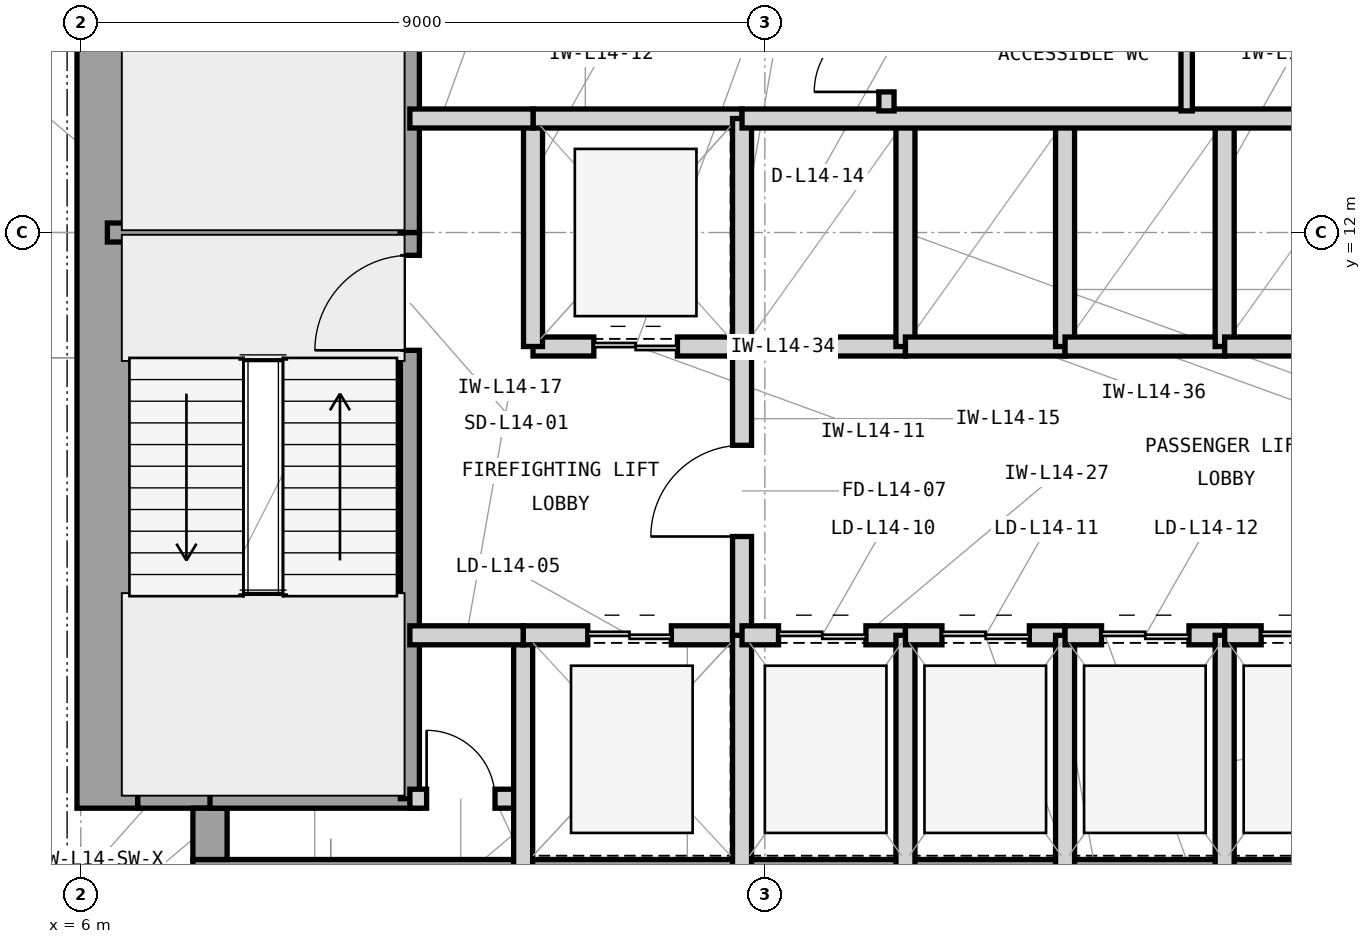
"""IFC4 building model, lengths in metres.
Left out: names, types, materials, properties, quantities, classifications, styles, units other than length and angle.
Written with IfcOpenShell. Run it as: python <this file> out.ifc"""

import sys

from ifc_helpers import new_model, si_unit, direction, frame, frame_2d, origin, place, context, subcontext, project, spatial, rectangle, extrude, element, fill, save


model = new_model("IFC4")
c1 = context("Model", 3, precision=1e-05, world=origin(), true_north=direction((0.0, 1.0)))
c2 = subcontext(c1, "Body", "Model", "MODEL_VIEW")
j1 = project(units=[si_unit("LENGTHUNIT", "METRE"), si_unit("PLANEANGLEUNIT", "RADIAN")], contexts=[c1])
p1 = place(None, origin())
s1 = spatial("IfcSite", under=j1, at=p1, CompositionType="ELEMENT")
p2 = place(p1, origin())
s2 = spatial("IfcBuilding", under=s1, at=p2, CompositionType="ELEMENT")
p3 = place(p2, frame((0.0, 0.0, 63.6)))
s3 = spatial("IfcBuildingStorey", under=s2, at=p3, CompositionType="ELEMENT", Elevation=63.6)
p4 = place(p3, frame((7.475, 3.35, 0.0), z_axis=(0.0, 0.0, 1.0), x_axis=(1.0, 0.0, 0.0)))
e1 = element("IfcWall", 1, at=p4, inside=s3, PredefinedType="SHEAR", context=c2, shape_type="SweptSolid", body=[
    extrude(rectangle(XDim=16.575, YDim=0.8, at=frame_2d((8.288, 0.0))), origin(), (0.0, 0.0, 1.0), 4.2),
])
p5 = place(p3, frame((6.35, 4.425, 0.0), z_axis=(0.0, 0.0, 1.0), x_axis=(0.0, 1.0, 0.0)))
e2 = element("IfcWall", 2, at=p5, inside=s3, PredefinedType="SHEAR", context=c2, shape_type="SweptSolid", body=[
    extrude(rectangle(XDim=15.15, YDim=0.8, at=frame_2d((7.575, 0.0))), origin(), (0.0, 0.0, 1.0), 4.2),
])
p6 = place(p3, frame((6.75, 4.65, 0.0), z_axis=(0.0, 0.0, 1.0), x_axis=(1.0, 0.0, 0.0)))
e3 = element("IfcWall", 3, at=p6, inside=s3, PredefinedType="SHEAR", context=c2, shape_type="SweptSolid", body=[
    extrude(rectangle(XDim=1.175, YDim=0.45, at=frame_2d((0.587, 0.0))), origin(), (0.0, 0.0, 1.0), 4.2),
])
p7 = place(p3, frame((7.7, 3.75, 0.0), z_axis=(0.0, 0.0, 1.0), x_axis=(0.0, 1.0, 0.0)))
e4 = element("IfcWall", 4, at=p7, inside=s3, PredefinedType="SHEAR", context=c2, shape_type="SweptSolid", body=[
    extrude(rectangle(XDim=0.675, YDim=0.45, at=frame_2d((0.337, 0.0))), origin(), (0.0, 0.0, 1.0), 4.2),
])
p8 = place(p3, frame((6.35, 12.0, 0.0), z_axis=(0.0, 0.0, 1.0), x_axis=(1.0, 0.0, 0.0)))
e5 = element("IfcWall", 5, at=p8, inside=s3, PredefinedType="SHEAR", context=c2, shape_type="SweptSolid", body=[
    extrude(rectangle(XDim=4.105, YDim=0.25, at=frame_2d((2.052, 0.0))), origin(), (0.0, 0.0, 1.0), 4.2),
])
p9 = place(p3, frame((7.7, 4.55, 0.0), z_axis=(0.0, 0.0, 1.0), x_axis=(1.0, 0.0, 0.0)))
e6 = element("IfcWall", 6, at=p9, inside=s3, PredefinedType="SHEAR", context=c2, shape_type="SweptSolid", body=[
    extrude(rectangle(XDim=2.755, YDim=0.25, at=frame_2d((1.377, 0.0))), origin(), (0.0, 0.0, 1.0), 4.2),
])
p10 = place(p3, frame((10.33, 4.55, 0.0), z_axis=(0.0, 0.0, 1.0), x_axis=(0.0, 1.0, 0.0)))
e7 = element("IfcWall", 7, at=p10, inside=s3, PredefinedType="SHEAR", context=c2, shape_type="SweptSolid", body=[
    extrude(rectangle(XDim=7.45, YDim=0.25, at=frame_2d((3.725, 0.0))), origin(), (0.0, 0.0, 1.0), 4.2),
])
p11 = place(p10, frame((5.9, 0.0, 0.0)))
e8 = element("IfcOpeningElement", 8, at=p11, cuts=e7, PredefinedType="OPENING", context=c2, shape_type="SweptSolid", body=[
    extrude(rectangle(XDim=1.25, YDim=2.2, at=frame_2d((0.625, 1.1))), frame((0.0, 0.135, 0.0), z_axis=(0.0, -1.0, 0.0), x_axis=(1.0, 0.0, 0.0)), (0.0, 0.0, 1.0), 0.27),
])
p12 = place(p3, frame((10.33, 12.0, 0.0), z_axis=(0.0, 0.0, 1.0), x_axis=(0.0, 1.0, 0.0)))
e9 = element("IfcWall", 9, at=p12, inside=s3, PredefinedType="SHEAR", context=c2, shape_type="SweptSolid", body=[
    extrude(rectangle(XDim=7.45, YDim=0.25, at=frame_2d((3.725, 0.0))), origin(), (0.0, 0.0, 1.0), 4.2),
])
p13 = place(p12, frame((5.85, 0.0, 0.0)))
e10 = element("IfcOpeningElement", 10, at=p13, cuts=e9, PredefinedType="OPENING", context=c2, shape_type="SweptSolid", body=[
    extrude(rectangle(XDim=1.25, YDim=2.2, at=frame_2d((0.625, 1.1))), frame((0.0, 0.135, 0.0), z_axis=(0.0, -1.0, 0.0), x_axis=(1.0, 0.0, 0.0)), (0.0, 0.0, 1.0), 0.27),
])
p14 = place(p3, frame((10.33, 4.55, 0.0), z_axis=(0.0, 0.0, 1.0), x_axis=(1.0, 0.0, 0.0)))
e11 = element("IfcWall", 11, at=p14, inside=s3, PredefinedType="PARTITIONING", context=c2, shape_type="SweptSolid", body=[
    extrude(rectangle(XDim=1.49, YDim=0.25, at=frame_2d((0.745, 0.0))), origin(), (0.0, 0.0, 1.0), 3.97),
])
p15 = place(p14, frame((0.22, 0.0, 0.0)))
e12 = element("IfcOpeningElement", 12, at=p15, cuts=e11, PredefinedType="OPENING", context=c2, shape_type="SweptSolid", body=[
    extrude(rectangle(XDim=0.9, YDim=2.1, at=frame_2d((0.45, 1.05))), frame((0.0, 0.135, 0.0), z_axis=(0.0, -1.0, 0.0), x_axis=(1.0, 0.0, 0.0)), (0.0, 0.0, 1.0), 0.27),
])
p16 = place(p3, frame((11.82, 3.35, 0.0), z_axis=(0.0, 0.0, 1.0), x_axis=(0.0, 1.0, 0.0)))
e13 = element("IfcWall", 13, at=p16, inside=s3, PredefinedType="PARTITIONING", context=c2, shape_type="SweptSolid", body=[
    extrude(rectangle(XDim=3.35, YDim=0.25, at=frame_2d((1.675, 0.0))), origin(), (0.0, 0.0, 1.0), 3.97),
])
p17 = place(p3, frame((11.82, 6.7, 0.0), z_axis=(0.0, 0.0, 1.0), x_axis=(1.0, 0.0, 0.0)))
e14 = element("IfcWall", 14, at=p17, inside=s3, PredefinedType="PARTITIONING", context=c2, shape_type="SweptSolid", body=[
    extrude(rectangle(XDim=2.88, YDim=0.25, at=frame_2d((1.44, 0.0))), origin(), (0.0, 0.0, 1.0), 3.426),
])
p18 = place(p17, frame((0.85, 0.0, 0.0)))
e15 = element("IfcOpeningElement", 15, at=p18, cuts=e14, PredefinedType="OPENING", context=c2, shape_type="SweptSolid", body=[
    extrude(rectangle(XDim=1.1, YDim=2.25, at=frame_2d((0.55, 1.125))), frame((0.0, 0.135, 0.0), z_axis=(0.0, -1.0, 0.0), x_axis=(1.0, 0.0, 0.0)), (0.0, 0.0, 1.0), 0.27),
])
p19 = place(p3, frame((14.7, 3.35, 0.0), z_axis=(0.0, 0.0, 1.0), x_axis=(0.0, 1.0, 0.0)))
e16 = element("IfcWall", 16, at=p19, inside=s3, PredefinedType="PARTITIONING", context=c2, shape_type="SweptSolid", body=[
    extrude(rectangle(XDim=3.35, YDim=0.25, at=frame_2d((1.675, 0.0))), origin(), (0.0, 0.0, 1.0), 3.97),
])
p20 = place(p3, frame((11.95, 10.5, 0.0), z_axis=(0.0, 0.0, 1.0), x_axis=(1.0, 0.0, 0.0)))
e17 = element("IfcWall", 17, at=p20, inside=s3, PredefinedType="PARTITIONING", context=c2, shape_type="SweptSolid", body=[
    extrude(rectangle(XDim=2.75, YDim=0.25, at=frame_2d((1.375, 0.0))), origin(), (0.0, 0.0, 1.0), 3.426),
])
p21 = place(p20, frame((0.8, 0.0, 0.0)))
e18 = element("IfcOpeningElement", 18, at=p21, cuts=e17, PredefinedType="OPENING", context=c2, shape_type="SweptSolid", body=[
    extrude(rectangle(XDim=1.1, YDim=2.25, at=frame_2d((0.55, 1.125))), frame((0.0, 0.135, 0.0), z_axis=(0.0, -1.0, 0.0), x_axis=(1.0, 0.0, 0.0)), (0.0, 0.0, 1.0), 0.27),
])
p22 = place(p3, frame((11.95, 10.5, 0.0), z_axis=(0.0, 0.0, 1.0), x_axis=(0.0, 1.0, 0.0)))
e19 = element("IfcWall", 19, at=p22, inside=s3, PredefinedType="PARTITIONING", context=c2, shape_type="SweptSolid", body=[
    extrude(rectangle(XDim=3.0, YDim=0.25, at=frame_2d((1.5, 0.0))), origin(), (0.0, 0.0, 1.0), 3.97),
])
p23 = place(p3, frame((11.95, 13.5, 0.0), z_axis=(0.0, 0.0, 1.0), x_axis=(1.0, 0.0, 0.0)))
e20 = element("IfcWall", 20, at=p23, inside=s3, PredefinedType="PARTITIONING", context=c2, shape_type="SweptSolid", body=[
    extrude(rectangle(XDim=2.75, YDim=0.25, at=frame_2d((1.375, 0.0))), origin(), (0.0, 0.0, 1.0), 3.426),
])
p24 = place(p3, frame((14.7, 10.5, 0.0), z_axis=(0.0, 0.0, 1.0), x_axis=(0.0, 1.0, 0.0)))
e21 = element("IfcWall", 21, at=p24, inside=s3, PredefinedType="PARTITIONING", context=c2, shape_type="SweptSolid", body=[
    extrude(rectangle(XDim=3.0, YDim=0.25, at=frame_2d((1.5, 0.0))), origin(), (0.0, 0.0, 1.0), 3.97),
])
p25 = place(p3, frame((14.7, 6.7, 0.0), z_axis=(0.0, 0.0, 1.0), x_axis=(0.0, 1.0, 0.0)))
e22 = element("IfcWall", 22, at=p25, inside=s3, PredefinedType="PARTITIONING", context=c2, shape_type="SweptSolid", body=[
    extrude(rectangle(XDim=3.8, YDim=0.25, at=frame_2d((1.9, 0.0))), origin(), (0.0, 0.0, 1.0), 3.97),
])
p26 = place(p25, frame((1.3, 0.0, 0.0)))
e23 = element("IfcOpeningElement", 23, at=p26, cuts=e22, PredefinedType="OPENING", context=c2, shape_type="SweptSolid", body=[
    extrude(rectangle(XDim=1.2, YDim=2.2, at=frame_2d((0.6, 1.1))), frame((0.0, 0.135, 0.0), z_axis=(0.0, -1.0, 0.0), x_axis=(1.0, 0.0, 0.0)), (0.0, 0.0, 1.0), 0.27),
])
p27 = place(p3, frame((10.33, 13.5, 0.0), z_axis=(0.0, 0.0, 1.0), x_axis=(1.0, 0.0, 0.0)))
e24 = element("IfcWall", 24, at=p27, inside=s3, PredefinedType="PARTITIONING", context=c2, shape_type="SweptSolid", body=[
    extrude(rectangle(XDim=1.62, YDim=0.25, at=frame_2d((0.81, 0.0))), origin(), (0.0, 0.0, 1.0), 3.426),
])
p28 = place(p3, frame((10.33, 6.7, 0.0), z_axis=(0.0, 0.0, 1.0), x_axis=(1.0, 0.0, 0.0)))
e25 = element("IfcWall", 25, at=p28, inside=s3, PredefinedType="PARTITIONING", context=c2, shape_type="SweptSolid", body=[
    extrude(rectangle(XDim=1.49, YDim=0.25, at=frame_2d((0.745, 0.0))), origin(), (0.0, 0.0, 1.0), 3.426),
])
p29 = place(p3, frame((14.7, 6.7, 0.0), z_axis=(0.0, 0.0, 1.0), x_axis=(1.0, 0.0, 0.0)))
e26 = element("IfcWall", 26, at=p29, inside=s3, PredefinedType="PARTITIONING", context=c2, shape_type="SweptSolid", body=[
    extrude(rectangle(XDim=2.15, YDim=0.25, at=frame_2d((1.075, 0.0))), origin(), (0.0, 0.0, 1.0), 3.426),
])
p30 = place(p29, frame((0.48, 0.0, 0.0)))
e27 = element("IfcOpeningElement", 27, at=p30, cuts=e26, PredefinedType="OPENING", context=c2, shape_type="SweptSolid", body=[
    extrude(rectangle(XDim=1.15, YDim=2.25, at=frame_2d((0.575, 1.125))), frame((0.0, 0.135, 0.0), z_axis=(0.0, -1.0, 0.0), x_axis=(1.0, 0.0, 0.0)), (0.0, 0.0, 1.0), 0.27),
])
p31 = place(p3, frame((16.85, 3.35, 0.0), z_axis=(0.0, 0.0, 1.0), x_axis=(0.0, 1.0, 0.0)))
e28 = element("IfcWall", 28, at=p31, inside=s3, PredefinedType="PARTITIONING", context=c2, shape_type="SweptSolid", body=[
    extrude(rectangle(XDim=3.35, YDim=0.25, at=frame_2d((1.675, 0.0))), origin(), (0.0, 0.0, 1.0), 3.97),
])
p32 = place(p3, frame((16.85, 6.7, 0.0), z_axis=(0.0, 0.0, 1.0), x_axis=(1.0, 0.0, 0.0)))
e29 = element("IfcWall", 29, at=p32, inside=s3, PredefinedType="PARTITIONING", context=c2, shape_type="SweptSolid", body=[
    extrude(rectangle(XDim=2.1, YDim=0.25, at=frame_2d((1.05, 0.0))), origin(), (0.0, 0.0, 1.0), 3.426),
])
p33 = place(p32, frame((0.48, 0.0, 0.0)))
e30 = element("IfcOpeningElement", 30, at=p33, cuts=e29, PredefinedType="OPENING", context=c2, shape_type="SweptSolid", body=[
    extrude(rectangle(XDim=1.15, YDim=2.25, at=frame_2d((0.575, 1.125))), frame((0.0, 0.135, 0.0), z_axis=(0.0, -1.0, 0.0), x_axis=(1.0, 0.0, 0.0)), (0.0, 0.0, 1.0), 0.27),
])
p34 = place(p3, frame((18.95, 3.35, 0.0), z_axis=(0.0, 0.0, 1.0), x_axis=(0.0, 1.0, 0.0)))
e31 = element("IfcWall", 31, at=p34, inside=s3, PredefinedType="PARTITIONING", context=c2, shape_type="SweptSolid", body=[
    extrude(rectangle(XDim=3.35, YDim=0.25, at=frame_2d((1.675, 0.0))), origin(), (0.0, 0.0, 1.0), 3.97),
])
p35 = place(p3, frame((18.95, 6.7, 0.0), z_axis=(0.0, 0.0, 1.0), x_axis=(1.0, 0.0, 0.0)))
e32 = element("IfcWall", 32, at=p35, inside=s3, PredefinedType="PARTITIONING", context=c2, shape_type="SweptSolid", body=[
    extrude(rectangle(XDim=2.1, YDim=0.25, at=frame_2d((1.05, 0.0))), origin(), (0.0, 0.0, 1.0), 3.426),
])
p36 = place(p35, frame((0.48, 0.0, 0.0)))
e33 = element("IfcOpeningElement", 33, at=p36, cuts=e32, PredefinedType="OPENING", context=c2, shape_type="SweptSolid", body=[
    extrude(rectangle(XDim=1.15, YDim=2.25, at=frame_2d((0.575, 1.125))), frame((0.0, 0.135, 0.0), z_axis=(0.0, -1.0, 0.0), x_axis=(1.0, 0.0, 0.0)), (0.0, 0.0, 1.0), 0.27),
])
p37 = place(p3, frame((21.05, 3.35, 0.0), z_axis=(0.0, 0.0, 1.0), x_axis=(0.0, 1.0, 0.0)))
e34 = element("IfcWall", 34, at=p37, inside=s3, PredefinedType="PARTITIONING", context=c2, shape_type="SweptSolid", body=[
    extrude(rectangle(XDim=3.35, YDim=0.25, at=frame_2d((1.675, 0.0))), origin(), (0.0, 0.0, 1.0), 3.97),
])
p38 = place(p3, frame((21.05, 6.7, 0.0), z_axis=(0.0, 0.0, 1.0), x_axis=(1.0, 0.0, 0.0)))
e35 = element("IfcWall", 35, at=p38, inside=s3, PredefinedType="PARTITIONING", context=c2, shape_type="SweptSolid", body=[
    extrude(rectangle(XDim=2.4, YDim=0.25, at=frame_2d((1.2, 0.0))), origin(), (0.0, 0.0, 1.0), 3.426),
])
p39 = place(p38, frame((0.48, 0.0, 0.0)))
e36 = element("IfcOpeningElement", 36, at=p39, cuts=e35, PredefinedType="OPENING", context=c2, shape_type="SweptSolid", body=[
    extrude(rectangle(XDim=1.15, YDim=2.25, at=frame_2d((0.575, 1.125))), frame((0.0, 0.135, 0.0), z_axis=(0.0, -1.0, 0.0), x_axis=(1.0, 0.0, 0.0)), (0.0, 0.0, 1.0), 0.27),
])
p40 = place(p3, frame((14.7, 10.5, 0.0), z_axis=(0.0, 0.0, 1.0), x_axis=(1.0, 0.0, 0.0)))
e37 = element("IfcWall", 37, at=p40, inside=s3, PredefinedType="PARTITIONING", context=c2, shape_type="SweptSolid", body=[
    extrude(rectangle(XDim=2.15, YDim=0.25, at=frame_2d((1.075, 0.0))), origin(), (0.0, 0.0, 1.0), 3.426),
])
p41 = place(p3, frame((16.85, 10.5, 0.0), z_axis=(0.0, 0.0, 1.0), x_axis=(0.0, 1.0, 0.0)))
e38 = element("IfcWall", 38, at=p41, inside=s3, PredefinedType="PARTITIONING", context=c2, shape_type="SweptSolid", body=[
    extrude(rectangle(XDim=3.0, YDim=0.25, at=frame_2d((1.5, 0.0))), origin(), (0.0, 0.0, 1.0), 3.97),
])
p42 = place(p3, frame((16.85, 10.5, 0.0), z_axis=(0.0, 0.0, 1.0), x_axis=(1.0, 0.0, 0.0)))
e39 = element("IfcWall", 39, at=p42, inside=s3, PredefinedType="PARTITIONING", context=c2, shape_type="SweptSolid", body=[
    extrude(rectangle(XDim=2.1, YDim=0.25, at=frame_2d((1.05, 0.0))), origin(), (0.0, 0.0, 1.0), 3.426),
])
p43 = place(p3, frame((18.95, 10.5, 0.0), z_axis=(0.0, 0.0, 1.0), x_axis=(0.0, 1.0, 0.0)))
e40 = element("IfcWall", 40, at=p43, inside=s3, PredefinedType="PARTITIONING", context=c2, shape_type="SweptSolid", body=[
    extrude(rectangle(XDim=3.0, YDim=0.25, at=frame_2d((1.5, 0.0))), origin(), (0.0, 0.0, 1.0), 3.97),
])
p44 = place(p3, frame((18.95, 10.5, 0.0), z_axis=(0.0, 0.0, 1.0), x_axis=(1.0, 0.0, 0.0)))
e41 = element("IfcWall", 41, at=p44, inside=s3, PredefinedType="PARTITIONING", context=c2, shape_type="SweptSolid", body=[
    extrude(rectangle(XDim=2.1, YDim=0.25, at=frame_2d((1.05, 0.0))), origin(), (0.0, 0.0, 1.0), 3.426),
])
p45 = place(p3, frame((21.05, 10.5, 0.0), z_axis=(0.0, 0.0, 1.0), x_axis=(0.0, 1.0, 0.0)))
e42 = element("IfcWall", 42, at=p45, inside=s3, PredefinedType="PARTITIONING", context=c2, shape_type="SweptSolid", body=[
    extrude(rectangle(XDim=3.0, YDim=0.25, at=frame_2d((1.5, 0.0))), origin(), (0.0, 0.0, 1.0), 3.97),
])
p46 = place(p3, frame((21.05, 10.5, 0.0), z_axis=(0.0, 0.0, 1.0), x_axis=(1.0, 0.0, 0.0)))
e43 = element("IfcWall", 43, at=p46, inside=s3, PredefinedType="PARTITIONING", context=c2, shape_type="SweptSolid", body=[
    extrude(rectangle(XDim=2.4, YDim=0.25, at=frame_2d((1.2, 0.0))), origin(), (0.0, 0.0, 1.0), 3.426),
])
p47 = place(p3, frame((14.7, 13.5, 0.0), z_axis=(0.0, 0.0, 1.0), x_axis=(1.0, 0.0, 0.0)))
e44 = element("IfcWall", 44, at=p47, inside=s3, PredefinedType="PARTITIONING", context=c2, shape_type="SweptSolid", body=[
    extrude(rectangle(XDim=8.95, YDim=0.25, at=frame_2d((4.475, 0.0))), origin(), (0.0, 0.0, 1.0), 3.426),
])
p48 = place(p3, frame((16.6, 13.6, 0.0), z_axis=(0.0, 0.0, 1.0), x_axis=(0.0, 1.0, 0.0)))
e45 = element("IfcWall", 45, at=p48, inside=s3, PredefinedType="PARTITIONING", context=c2, shape_type="SweptSolid", body=[
    extrude(rectangle(XDim=3.0, YDim=0.2, at=frame_2d((1.5, 0.0))), origin(), (0.0, 0.0, 1.0), 3.97),
])
p49 = place(p48, frame((0.25, 0.0, 0.0)))
e46 = element("IfcOpeningElement", 46, at=p49, cuts=e45, PredefinedType="OPENING", context=c2, shape_type="SweptSolid", body=[
    extrude(rectangle(XDim=0.95, YDim=2.1, at=frame_2d((0.475, 1.05))), frame((0.0, 0.11, 0.0), z_axis=(0.0, -1.0, 0.0), x_axis=(1.0, 0.0, 0.0)), (0.0, 0.0, 1.0), 0.22),
])
p50 = place(p48, frame((1.8, 0.0, 0.0)))
e47 = element("IfcOpeningElement", 47, at=p50, cuts=e45, PredefinedType="OPENING", context=c2, shape_type="SweptSolid", body=[
    extrude(rectangle(XDim=0.95, YDim=2.1, at=frame_2d((0.475, 1.05))), frame((0.0, 0.11, 0.0), z_axis=(0.0, -1.0, 0.0), x_axis=(1.0, 0.0, 0.0)), (0.0, 0.0, 1.0), 0.22),
])
p51 = place(p3, frame((20.55, 13.6, 0.0), z_axis=(0.0, 0.0, 1.0), x_axis=(0.0, 1.0, 0.0)))
e48 = element("IfcWall", 48, at=p51, inside=s3, PredefinedType="PARTITIONING", context=c2, shape_type="SweptSolid", body=[
    extrude(rectangle(XDim=3.0, YDim=0.15, at=frame_2d((1.5, 0.0))), origin(), (0.0, 0.0, 1.0), 3.97),
])
p52 = place(p11, origin())
e49 = element("IfcDoor", 49, at=p52, inside=s3, OperationType="SINGLE_SWING_LEFT", PredefinedType="DOOR", context=c2, shape_type="SweptSolid", body=[
    extrude(rectangle(XDim=1.25, YDim=2.2, at=frame_2d((0.625, 1.1))), frame((0.0, 0.025, 0.0), z_axis=(0.0, -1.0, 0.0), x_axis=(1.0, 0.0, 0.0)), (0.0, 0.0, 1.0), 0.05),
])
fill(e8, e49)
p53 = place(p15, origin())
e50 = element("IfcDoor", 50, at=p53, inside=s3, OperationType="SINGLE_SWING_LEFT", PredefinedType="TRAPDOOR", context=c2, shape_type="SweptSolid", body=[
    extrude(rectangle(XDim=0.9, YDim=2.1, at=frame_2d((0.45, 1.05))), frame((0.0, 0.025, 0.0), z_axis=(0.0, -1.0, 0.0), x_axis=(1.0, 0.0, 0.0)), (0.0, 0.0, 1.0), 0.05),
])
fill(e12, e50)
p54 = place(p18, origin())
e51 = element("IfcDoor", 51, at=p54, inside=s3, OperationType="DOUBLE_DOOR_SLIDING", PredefinedType="DOOR", context=c2, shape_type="SweptSolid", body=[
    extrude(rectangle(XDim=1.1, YDim=2.25, at=frame_2d((0.55, 1.125))), frame((0.0, 0.025, 0.0), z_axis=(0.0, -1.0, 0.0), x_axis=(1.0, 0.0, 0.0)), (0.0, 0.0, 1.0), 0.05),
])
fill(e15, e51)
p55 = place(p21, origin())
e52 = element("IfcDoor", 52, at=p55, inside=s3, OperationType="DOUBLE_DOOR_SLIDING", PredefinedType="DOOR", context=c2, shape_type="SweptSolid", body=[
    extrude(rectangle(XDim=1.1, YDim=2.25, at=frame_2d((0.55, 1.125))), frame((0.0, 0.025, 0.0), z_axis=(0.0, -1.0, 0.0), x_axis=(1.0, 0.0, 0.0)), (0.0, 0.0, 1.0), 0.05),
])
fill(e18, e52)
p56 = place(p26, origin())
e53 = element("IfcDoor", 53, at=p56, inside=s3, OperationType="SINGLE_SWING_LEFT", PredefinedType="DOOR", context=c2, shape_type="SweptSolid", body=[
    extrude(rectangle(XDim=1.2, YDim=2.2, at=frame_2d((0.6, 1.1))), frame((0.0, 0.025, 0.0), z_axis=(0.0, -1.0, 0.0), x_axis=(1.0, 0.0, 0.0)), (0.0, 0.0, 1.0), 0.05),
])
fill(e23, e53)
p57 = place(p30, origin())
e54 = element("IfcDoor", 54, at=p57, inside=s3, OperationType="DOUBLE_DOOR_SLIDING", PredefinedType="DOOR", context=c2, shape_type="SweptSolid", body=[
    extrude(rectangle(XDim=1.15, YDim=2.25, at=frame_2d((0.575, 1.125))), frame((0.0, 0.025, 0.0), z_axis=(0.0, -1.0, 0.0), x_axis=(1.0, 0.0, 0.0)), (0.0, 0.0, 1.0), 0.05),
])
fill(e27, e54)
p58 = place(p33, origin())
e55 = element("IfcDoor", 55, at=p58, inside=s3, OperationType="DOUBLE_DOOR_SLIDING", PredefinedType="DOOR", context=c2, shape_type="SweptSolid", body=[
    extrude(rectangle(XDim=1.15, YDim=2.25, at=frame_2d((0.575, 1.125))), frame((0.0, 0.025, 0.0), z_axis=(0.0, -1.0, 0.0), x_axis=(1.0, 0.0, 0.0)), (0.0, 0.0, 1.0), 0.05),
])
fill(e30, e55)
p59 = place(p36, origin())
e56 = element("IfcDoor", 56, at=p59, inside=s3, OperationType="DOUBLE_DOOR_SLIDING", PredefinedType="DOOR", context=c2, shape_type="SweptSolid", body=[
    extrude(rectangle(XDim=1.15, YDim=2.25, at=frame_2d((0.575, 1.125))), frame((0.0, 0.025, 0.0), z_axis=(0.0, -1.0, 0.0), x_axis=(1.0, 0.0, 0.0)), (0.0, 0.0, 1.0), 0.05),
])
fill(e33, e56)
p60 = place(p39, origin())
e57 = element("IfcDoor", 57, at=p60, inside=s3, OperationType="DOUBLE_DOOR_SLIDING", PredefinedType="DOOR", context=c2, shape_type="SweptSolid", body=[
    extrude(rectangle(XDim=1.15, YDim=2.25, at=frame_2d((0.575, 1.125))), frame((0.0, 0.025, 0.0), z_axis=(0.0, -1.0, 0.0), x_axis=(1.0, 0.0, 0.0)), (0.0, 0.0, 1.0), 0.05),
])
fill(e36, e57)
p61 = place(p49, origin())
e58 = element("IfcDoor", 58, at=p61, inside=s3, OperationType="SINGLE_SWING_LEFT", PredefinedType="DOOR", context=c2, shape_type="SweptSolid", body=[
    extrude(rectangle(XDim=0.95, YDim=2.1, at=frame_2d((0.475, 1.05))), frame((0.0, 0.025, 0.0), z_axis=(0.0, -1.0, 0.0), x_axis=(1.0, 0.0, 0.0)), (0.0, 0.0, 1.0), 0.05),
])
fill(e46, e58)
save(model, sys.argv[1])
